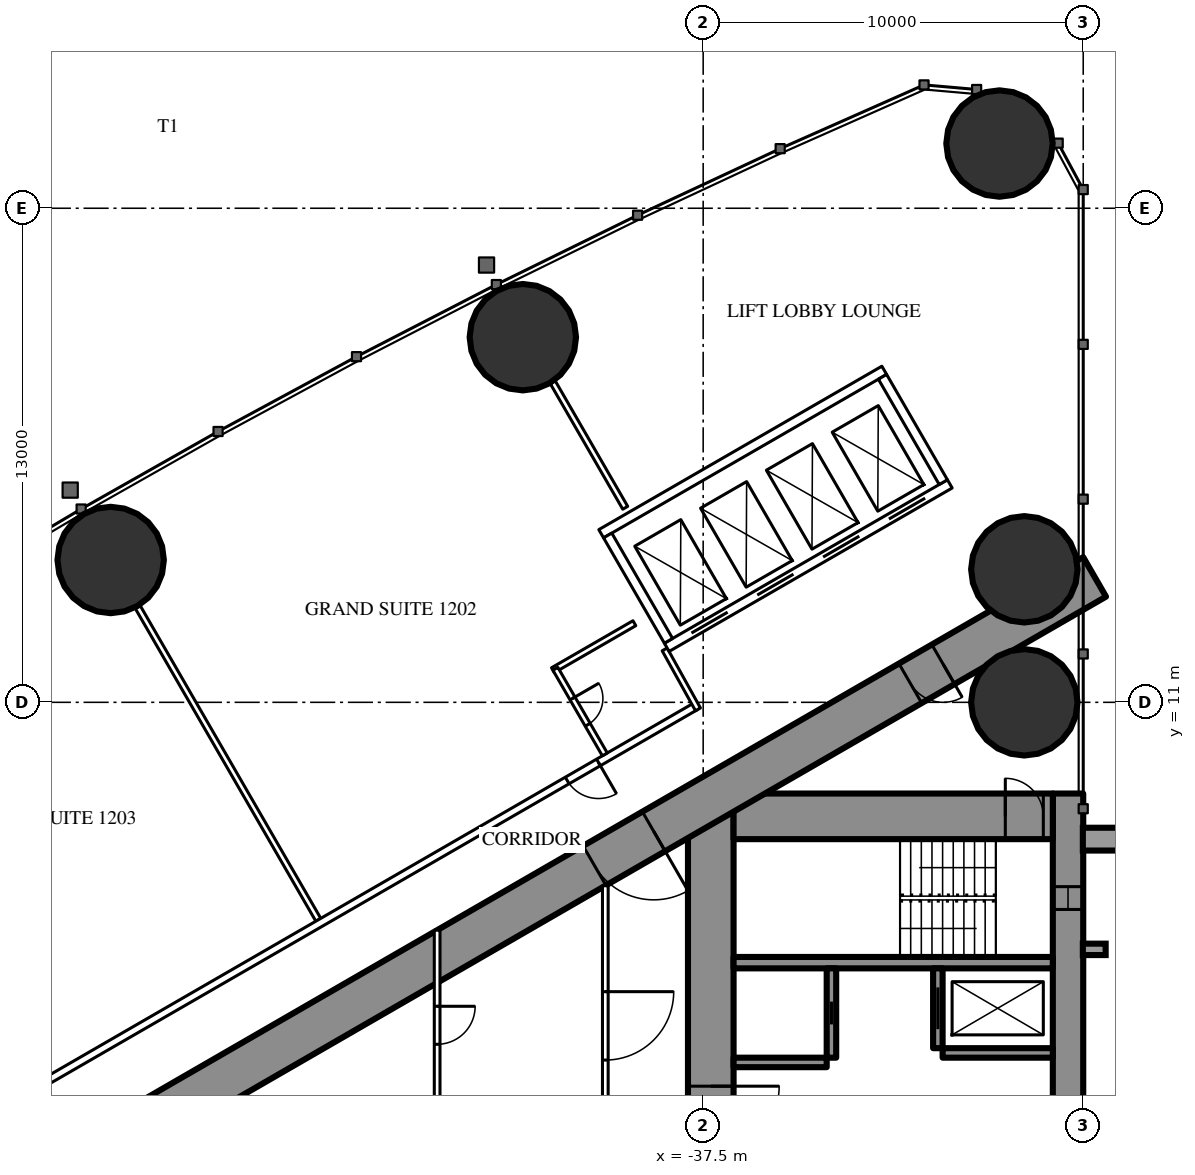
"""IFC4 building model, lengths in metres.
Left out: names, types, materials, properties, quantities, classifications, styles, units other than length and angle.
Written with IfcOpenShell. Run it as: python <this file> out.ifc"""

import sys

from ifc_helpers import new_model, si_unit, direction, frame, frame_2d, origin, origin_2d, place, context, subcontext, project, spatial, rectangle, hollow_circle, extrude, element, fill, save


model = new_model("IFC4")
c1 = context("Model", 3, precision=1e-05, world=origin(), true_north=direction((0.0, 1.0)))
c2 = subcontext(c1, "Body", "Model", "MODEL_VIEW")
j1 = project(units=[si_unit("LENGTHUNIT", "METRE"), si_unit("PLANEANGLEUNIT", "RADIAN")], contexts=[c1])
p1 = place(None, origin())
s1 = spatial("IfcSite", under=j1, at=p1, CompositionType="ELEMENT")
p2 = place(p1, origin())
s2 = spatial("IfcBuilding", under=s1, at=p2, CompositionType="ELEMENT")
p3 = place(p2, frame((0.0, 0.0, 49.5)))
s3 = spatial("IfcBuildingStorey", under=s2, at=p3, CompositionType="ELEMENT", Elevation=49.5)
for number, where, z_axis, x_axis in (
    (1, (-29.703, 25.703, 0.0), (0.0, 0.0, 1.0), (1.0, 0.0, 0.0)),
    (2, (-29.05, 11.0, 0.0), (0.0, 0.0, 1.0), (1.0, 0.0, 0.0)),
    (3, (-29.05, 14.5, 0.0), (0.0, 0.0, 1.0), (1.0, 0.0, 0.0)),
    (4, (-42.245, 20.607, 0.0), (0.0, 0.0, 1.0), (1.0, 0.0, 0.0)),
    (5, (-53.09, 14.745, 0.0), (0.0, 0.0, 1.0), (1.0, 0.0, 0.0)),
):
    element("IfcColumn", number, at=place(p3, frame(where, z_axis=z_axis, x_axis=x_axis)), inside=s3, PredefinedType="COLUMN", context=c2, shape_type="SweptSolid", body=[
        extrude(hollow_circle(Radius=1.4, WallThickness=0.12, at=origin_2d()), origin(), (0.0, 0.0, 1.0), 3.5),
    ])
p4 = place(p3, frame((-27.9, 8.6, 0.0), z_axis=(0.0, 0.0, 1.0), x_axis=(0.0, -1.0, 0.0)))
e6 = element("IfcWall", 6, at=p4, inside=s3, PredefinedType="SHEAR", context=c2, shape_type="SweptSolid", body=[
    extrude(rectangle(XDim=17.2, YDim=0.8, at=frame_2d((8.6, 0.0))), origin(), (0.0, 0.0, 1.0), 3.5),
])
p5 = place(p4, frame((2.45, 0.0, 0.6)))
e7 = element("IfcOpeningElement", 7, at=p5, cuts=e6, PredefinedType="OPENING", context=c2, shape_type="SweptSolid", body=[
    extrude(rectangle(XDim=0.6, YDim=2.1, at=frame_2d((0.3, 1.05))), frame((0.0, 0.41, 0.0), z_axis=(0.0, -1.0, 0.0), x_axis=(1.0, 0.0, 0.0)), (0.0, 0.0, 1.0), 0.82),
])
p6 = place(p4, frame((14.15, 0.0, 0.6)))
e8 = element("IfcOpeningElement", 8, at=p6, cuts=e6, PredefinedType="OPENING", context=c2, shape_type="SweptSolid", body=[
    extrude(rectangle(XDim=0.6, YDim=2.1, at=frame_2d((0.3, 1.05))), frame((0.0, 0.41, 0.0), z_axis=(0.0, -1.0, 0.0), x_axis=(1.0, 0.0, 0.0)), (0.0, 0.0, 1.0), 0.82),
])
p7 = place(p3, frame((-37.3, 8.6, 0.0), z_axis=(0.0, 0.0, 1.0), x_axis=(0.0, -1.0, 0.0)))
e9 = element("IfcWall", 9, at=p7, inside=s3, PredefinedType="SHEAR", context=c2, shape_type="SweptSolid", body=[
    extrude(rectangle(XDim=17.2, YDim=1.2, at=frame_2d((8.6, 0.0))), origin(), (0.0, 0.0, 1.0), 3.5),
])
p8 = place(p7, frame((7.7, 0.0, 0.0)))
e10 = element("IfcOpeningElement", 10, at=p8, cuts=e9, PredefinedType="OPENING", context=c2, shape_type="SweptSolid", body=[
    extrude(rectangle(XDim=1.8, YDim=2.2, at=frame_2d((0.9, 1.1))), frame((0.0, 0.61, 0.0), z_axis=(0.0, -1.0, 0.0), x_axis=(1.0, 0.0, 0.0)), (0.0, 0.0, 1.0), 1.22),
])
p9 = place(p3, frame((-28.3, 8.0, 0.0), z_axis=(0.0, 0.0, 1.0), x_axis=(-1.0, 0.0, 0.0)))
e11 = element("IfcWall", 11, at=p9, inside=s3, PredefinedType="SHEAR", context=c2, shape_type="SweptSolid", body=[
    extrude(rectangle(XDim=8.4, YDim=1.2, at=frame_2d((4.2, 0.0))), origin(), (0.0, 0.0, 1.0), 3.5),
])
p10 = place(p9, frame((0.25, 0.0, 0.0)))
e12 = element("IfcOpeningElement", 12, at=p10, cuts=e11, PredefinedType="OPENING", context=c2, shape_type="SweptSolid", body=[
    extrude(rectangle(XDim=1.0, YDim=2.2, at=frame_2d((0.5, 1.1))), frame((0.0, 0.61, 0.0), z_axis=(0.0, -1.0, 0.0), x_axis=(1.0, 0.0, 0.0)), (0.0, 0.0, 1.0), 1.22),
])
p11 = place(p3, frame((-28.3, 4.15, 0.0), z_axis=(0.0, 0.0, 1.0), x_axis=(-1.0, 0.0, 0.0)))
e13 = element("IfcWall", 13, at=p11, inside=s3, PredefinedType="SHEAR", context=c2, shape_type="SweptSolid", body=[
    extrude(rectangle(XDim=8.4, YDim=0.3, at=frame_2d((4.2, 0.0))), origin(), (0.0, 0.0, 1.0), 3.5),
])
p12 = place(p3, frame((-31.325, 4.0, 0.0), z_axis=(0.0, 0.0, 1.0), x_axis=(0.0, -1.0, 0.0)))
e14 = element("IfcWall", 14, at=p12, inside=s3, PredefinedType="SHEAR", context=c2, shape_type="SweptSolid", body=[
    extrude(rectangle(XDim=2.1, YDim=0.25, at=frame_2d((1.05, 0.0))), origin(), (0.0, 0.0, 1.0), 3.5),
])
p13 = place(p12, frame((0.5, 0.0, 0.0)))
e15 = element("IfcOpeningElement", 15, at=p13, cuts=e14, PredefinedType="OPENING", context=c2, shape_type="SweptSolid", body=[
    extrude(rectangle(XDim=1.1, YDim=2.2, at=frame_2d((0.55, 1.1))), frame((0.0, 0.135, 0.0), z_axis=(0.0, -1.0, 0.0), x_axis=(1.0, 0.0, 0.0)), (0.0, 0.0, 1.0), 0.27),
])
p14 = place(p3, frame((-34.125, 4.0, 0.0), z_axis=(0.0, 0.0, 1.0), x_axis=(0.0, -1.0, 0.0)))
e16 = element("IfcWall", 16, at=p14, inside=s3, PredefinedType="SHEAR", context=c2, shape_type="SweptSolid", body=[
    extrude(rectangle(XDim=2.35, YDim=0.25, at=frame_2d((1.175, 0.0))), origin(), (0.0, 0.0, 1.0), 3.5),
])
p15 = place(p14, frame((0.875, 0.0, 0.0)))
e17 = element("IfcOpeningElement", 17, at=p15, cuts=e16, PredefinedType="OPENING", context=c2, shape_type="SweptSolid", body=[
    extrude(rectangle(XDim=0.6, YDim=2.0, at=frame_2d((0.3, 1.0))), frame((0.0, 0.135, 0.0), z_axis=(0.0, -1.0, 0.0), x_axis=(1.0, 0.0, 0.0)), (0.0, 0.0, 1.0), 0.27),
])
p16 = place(p3, frame((-28.3, 1.775, 0.0), z_axis=(0.0, 0.0, 1.0), x_axis=(-1.0, 0.0, 0.0)))
e18 = element("IfcWall", 18, at=p16, inside=s3, PredefinedType="SHEAR", context=c2, shape_type="SweptSolid", body=[
    extrude(rectangle(XDim=2.9, YDim=0.25, at=frame_2d((1.45, 0.0))), origin(), (0.0, 0.0, 1.0), 3.5),
])
p17 = place(p3, frame((-34.25, 1.525, 0.0), z_axis=(0.0, 0.0, 1.0), x_axis=(-1.0, 0.0, 0.0)))
e19 = element("IfcWall", 19, at=p17, inside=s3, PredefinedType="SHEAR", context=c2, shape_type="SweptSolid", body=[
    extrude(rectangle(XDim=2.45, YDim=0.25, at=frame_2d((1.225, 0.0))), origin(), (0.0, 0.0, 1.0), 3.5),
])
p18 = place(p3, frame((-27.2, 14.3, 0.0), z_axis=(0.0, 0.0, 1.0), x_axis=(-0.866026593062, -0.499997940104, 0.0)))
e20 = element("IfcWall", 20, at=p18, inside=s3, PredefinedType="SHEAR", context=c2, shape_type="SweptSolid", body=[
    extrude(rectangle(XDim=28.946, YDim=1.2, at=frame_2d((14.473, 0.0))), origin(), (0.0, 0.0, 1.0), 3.5),
])
p19 = place(p18, frame((4.6, 0.0, 0.0)))
e21 = element("IfcOpeningElement", 21, at=p19, cuts=e20, PredefinedType="OPENING", context=c2, shape_type="SweptSolid", body=[
    extrude(rectangle(XDim=1.0, YDim=2.2, at=frame_2d((0.5, 1.1))), frame((0.0, 0.61, 0.0), z_axis=(0.0, -1.0, 0.0), x_axis=(1.0, 0.0, 0.0)), (0.0, 0.0, 1.0), 1.22),
])
p20 = place(p18, frame((13.395, 0.0, 0.0)))
e22 = element("IfcOpeningElement", 22, at=p20, cuts=e20, PredefinedType="OPENING", context=c2, shape_type="SweptSolid", body=[
    extrude(rectangle(XDim=1.8, YDim=2.2, at=frame_2d((0.9, 1.1))), frame((0.0, 0.61, 0.0), z_axis=(0.0, -1.0, 0.0), x_axis=(1.0, 0.0, 0.0)), (0.0, 0.0, 1.0), 1.22),
])
p21 = place(p3, frame((-47.627, 5.278, 0.0), z_axis=(0.0, 0.0, 1.0), x_axis=(-0.500009844318, 0.86601972009, 0.0)))
e23 = element("IfcWall", 23, at=p21, inside=s3, PredefinedType="PARTITIONING", context=c2, shape_type="SweptSolid", body=[
    extrude(rectangle(XDim=9.51, YDim=0.15, at=frame_2d((4.755, 0.0))), origin(), (0.0, 0.0, 1.0), 2.25),
])
p22 = place(p3, frame((-39.551, 16.119, 0.0), z_axis=(0.0, 0.0, 1.0), x_axis=(-0.500014214979, 0.866017196607, 0.0)))
e24 = element("IfcWall", 24, at=p22, inside=s3, PredefinedType="PARTITIONING", context=c2, shape_type="SweptSolid", body=[
    extrude(rectangle(XDim=3.815, YDim=0.15, at=frame_2d((1.907, 0.0))), origin(), (0.0, 0.0, 1.0), 3.25),
])
p23 = place(p3, frame((-37.7, 10.894, 0.0), z_axis=(0.0, 0.0, 1.0), x_axis=(-0.866027905338, -0.499995667157, 0.0)))
e25 = element("IfcWall", 25, at=p23, inside=s3, PredefinedType="PARTITIONING", context=c2, shape_type="SweptSolid", body=[
    extrude(rectangle(XDim=21.787, YDim=0.2, at=frame_2d((10.894, 0.0))), origin(), (0.0, 0.0, 1.0), 3.25),
])
p24 = place(p23, frame((20.237, 0.0, 0.0)))
e26 = element("IfcOpeningElement", 26, at=p24, cuts=e25, PredefinedType="OPENING", context=c2, shape_type="SweptSolid", body=[
    extrude(rectangle(XDim=0.95, YDim=2.2, at=frame_2d((0.475, 1.1))), frame((0.0, 0.11, 0.0), z_axis=(0.0, -1.0, 0.0), x_axis=(1.0, 0.0, 0.0)), (0.0, 0.0, 1.0), 0.22),
])
p25 = place(p23, frame((2.95, 0.0, 0.0)))
e27 = element("IfcOpeningElement", 27, at=p25, cuts=e25, PredefinedType="OPENING", context=c2, shape_type="SweptSolid", body=[
    extrude(rectangle(XDim=0.95, YDim=2.2, at=frame_2d((0.475, 1.1))), frame((0.0, 0.11, 0.0), z_axis=(0.0, -1.0, 0.0), x_axis=(1.0, 0.0, 0.0)), (0.0, 0.0, 1.0), 0.22),
])
p26 = place(p3, frame((-38.513, 12.392, 0.0), z_axis=(0.0, 0.0, 1.0), x_axis=(0.485585508183, -0.874189175317, 0.0)))
e28 = element("IfcWall", 28, at=p26, inside=s3, PredefinedType="PARTITIONING", context=c2, shape_type="SweptSolid", body=[
    extrude(rectangle(XDim=1.805, YDim=0.15, at=frame_2d((0.902, 0.0))), origin(), (0.0, 0.0, 1.0), 3.25),
])
p27 = place(p3, frame((-39.31, 13.082, 0.0), z_axis=(0.0, 0.0, 1.0), x_axis=(-0.866031185235, -0.4999899861, 0.0)))
e29 = element("IfcWall", 29, at=p27, inside=s3, PredefinedType="PARTITIONING", context=c2, shape_type="SweptSolid", body=[
    extrude(rectangle(XDim=2.475, YDim=0.15, at=frame_2d((1.238, 0.0))), origin(), (0.0, 0.0, 1.0), 3.25),
])
p28 = place(p3, frame((-40.088, 9.63, 0.0), z_axis=(0.0, 0.0, 1.0), x_axis=(-0.500006934395, 0.866021400173, 0.0)))
e30 = element("IfcWall", 30, at=p28, inside=s3, PredefinedType="PARTITIONING", context=c2, shape_type="SweptSolid", body=[
    extrude(rectangle(XDim=2.6, YDim=0.15, at=frame_2d((1.3, 0.0))), origin(), (0.0, 0.0, 1.0), 3.25),
])
p29 = place(p28, frame((0.9, 0.0, 0.0)))
e31 = element("IfcOpeningElement", 31, at=p29, cuts=e30, PredefinedType="OPENING", context=c2, shape_type="SweptSolid", body=[
    extrude(rectangle(XDim=0.8, YDim=2.2, at=frame_2d((0.4, 1.1))), frame((0.0, 0.085, 0.0), z_axis=(0.0, -1.0, 0.0), x_axis=(1.0, 0.0, 0.0)), (0.0, 0.0, 1.0), 0.17),
])
p30 = place(p3, frame((-40.075, 6.174, 0.0), z_axis=(0.0, 0.0, 1.0), x_axis=(0.0, -1.0, 0.0)))
e32 = element("IfcWall", 32, at=p30, inside=s3, PredefinedType="PARTITIONING", context=c2, shape_type="SweptSolid", body=[
    extrude(rectangle(XDim=7.374, YDim=0.15, at=frame_2d((3.687, 0.0))), origin(), (0.0, 0.0, 1.0), 3.25),
])
p31 = place(p30, frame((2.787, 0.0, 0.0)))
e33 = element("IfcOpeningElement", 33, at=p31, cuts=e32, PredefinedType="OPENING", context=c2, shape_type="SweptSolid", body=[
    extrude(rectangle(XDim=1.8, YDim=2.2, at=frame_2d((0.9, 1.1))), frame((0.0, 0.085, 0.0), z_axis=(0.0, -1.0, 0.0), x_axis=(1.0, 0.0, 0.0)), (0.0, 0.0, 1.0), 0.17),
])
p32 = place(p3, frame((-44.5, 5.005, 0.0), z_axis=(0.0, 0.0, 1.0), x_axis=(0.0, -1.0, 0.0)))
e34 = element("IfcWall", 34, at=p32, inside=s3, PredefinedType="PARTITIONING", context=c2, shape_type="SweptSolid", body=[
    extrude(rectangle(XDim=10.009, YDim=0.15, at=frame_2d((5.005, 0.0))), origin(), (0.0, 0.0, 1.0), 2.45),
])
p33 = place(p32, frame((2.002, 0.0, 0.0)))
e35 = element("IfcOpeningElement", 35, at=p33, cuts=e34, PredefinedType="OPENING", context=c2, shape_type="SweptSolid", body=[
    extrude(rectangle(XDim=1.0, YDim=2.2, at=frame_2d((0.5, 1.1))), frame((0.0, 0.085, 0.0), z_axis=(0.0, -1.0, 0.0), x_axis=(1.0, 0.0, 0.0)), (0.0, 0.0, 1.0), 0.17),
])
p34 = place(p32, frame((7.007, 0.0, 0.0)))
e36 = element("IfcOpeningElement", 36, at=p34, cuts=e34, PredefinedType="OPENING", context=c2, shape_type="SweptSolid", body=[
    extrude(rectangle(XDim=1.0, YDim=2.2, at=frame_2d((0.5, 1.1))), frame((0.0, 0.085, 0.0), z_axis=(0.0, -1.0, 0.0), x_axis=(1.0, 0.0, 0.0)), (0.0, 0.0, 1.0), 0.17),
])
p35 = place(p3, frame((-31.01, 16.747, 0.0), z_axis=(0.0, 0.0, 1.0), x_axis=(-0.866028165386, -0.499995216735, 0.0)))
e37 = element("IfcWall", 37, at=p35, inside=s3, PredefinedType="PARTITIONING", context=c2, shape_type="SweptSolid", body=[
    extrude(rectangle(XDim=8.6, YDim=0.25, at=frame_2d((4.3, 0.0))), origin(), (0.0, 0.0, 1.0), 3.25),
])
p36 = place(p35, frame((0.75, 0.0, 0.0)))
e38 = element("IfcOpeningElement", 38, at=p36, cuts=e37, PredefinedType="OPENING", context=c2, shape_type="SweptSolid", body=[
    extrude(rectangle(XDim=1.1, YDim=2.2, at=frame_2d((0.55, 1.1))), frame((0.0, 0.135, 0.0), z_axis=(0.0, -1.0, 0.0), x_axis=(1.0, 0.0, 0.0)), (0.0, 0.0, 1.0), 0.27),
])
p37 = place(p35, frame((2.75, 0.0, 0.0)))
e39 = element("IfcOpeningElement", 39, at=p37, cuts=e37, PredefinedType="OPENING", context=c2, shape_type="SweptSolid", body=[
    extrude(rectangle(XDim=1.1, YDim=2.2, at=frame_2d((0.55, 1.1))), frame((0.0, 0.135, 0.0), z_axis=(0.0, -1.0, 0.0), x_axis=(1.0, 0.0, 0.0)), (0.0, 0.0, 1.0), 0.27),
])
p38 = place(p35, frame((4.75, 0.0, 0.0)))
e40 = element("IfcOpeningElement", 40, at=p38, cuts=e37, PredefinedType="OPENING", context=c2, shape_type="SweptSolid", body=[
    extrude(rectangle(XDim=1.1, YDim=2.2, at=frame_2d((0.55, 1.1))), frame((0.0, 0.135, 0.0), z_axis=(0.0, -1.0, 0.0), x_axis=(1.0, 0.0, 0.0)), (0.0, 0.0, 1.0), 0.27),
])
p39 = place(p35, frame((6.75, 0.0, 0.0)))
e41 = element("IfcOpeningElement", 41, at=p39, cuts=e37, PredefinedType="OPENING", context=c2, shape_type="SweptSolid", body=[
    extrude(rectangle(XDim=1.1, YDim=2.2, at=frame_2d((0.55, 1.1))), frame((0.0, 0.135, 0.0), z_axis=(0.0, -1.0, 0.0), x_axis=(1.0, 0.0, 0.0)), (0.0, 0.0, 1.0), 0.27),
])
p40 = place(p3, frame((-32.736, 19.736, 0.0), z_axis=(0.0, 0.0, 1.0), x_axis=(-0.866028165386, -0.499995216735, 0.0)))
e42 = element("IfcWall", 42, at=p40, inside=s3, PredefinedType="PARTITIONING", context=c2, shape_type="SweptSolid", body=[
    extrude(rectangle(XDim=8.6, YDim=0.25, at=frame_2d((4.3, 0.0))), origin(), (0.0, 0.0, 1.0), 3.25),
])
p41 = place(p3, frame((-31.181, 16.793, 0.0), z_axis=(0.0, 0.0, 1.0), x_axis=(-0.499929347863, 0.866066190972, 0.0)))
e43 = element("IfcWall", 43, at=p41, inside=s3, PredefinedType="PARTITIONING", context=c2, shape_type="SweptSolid", body=[
    extrude(rectangle(XDim=3.201, YDim=0.25, at=frame_2d((1.6, 0.0))), origin(), (0.0, 0.0, 1.0), 3.25),
])
p42 = place(p3, frame((-38.413, 12.618, 0.0), z_axis=(0.0, 0.0, 1.0), x_axis=(-0.499872130319, 0.866099216793, 0.0)))
e44 = element("IfcWall", 44, at=p42, inside=s3, PredefinedType="PARTITIONING", context=c2, shape_type="SweptSolid", body=[
    extrude(rectangle(XDim=3.2, YDim=0.25, at=frame_2d((1.6, 0.0))), origin(), (0.0, 0.0, 1.0), 3.25),
])
p43 = place(p29, origin())
e45 = element("IfcDoor", 45, at=p43, inside=s3, OperationType="SINGLE_SWING_RIGHT", PredefinedType="DOOR", context=c2, shape_type="SweptSolid", body=[
    extrude(rectangle(XDim=0.8, YDim=2.2, at=frame_2d((0.4, 1.1))), frame((0.0, 0.025, 0.0), z_axis=(0.0, -1.0, 0.0), x_axis=(1.0, 0.0, 0.0)), (0.0, 0.0, 1.0), 0.05),
])
fill(e31, e45)
p44 = place(p25, origin())
e46 = element("IfcDoor", 46, at=p44, inside=s3, OperationType="SINGLE_SWING_LEFT", PredefinedType="DOOR", context=c2, shape_type="SweptSolid", body=[
    extrude(rectangle(XDim=0.95, YDim=2.2, at=frame_2d((0.475, 1.1))), frame((0.0, 0.025, 0.0), z_axis=(0.0, -1.0, 0.0), x_axis=(1.0, 0.0, 0.0)), (0.0, 0.0, 1.0), 0.05),
])
fill(e27, e46)
p45 = place(p31, origin())
e47 = element("IfcDoor", 47, at=p45, inside=s3, OperationType="DOUBLE_DOOR_SINGLE_SWING", PredefinedType="DOOR", context=c2, shape_type="SweptSolid", body=[
    extrude(rectangle(XDim=1.8, YDim=2.2, at=frame_2d((0.9, 1.1))), frame((0.0, 0.025, 0.0), z_axis=(0.0, -1.0, 0.0), x_axis=(1.0, 0.0, 0.0)), (0.0, 0.0, 1.0), 0.05),
])
fill(e33, e47)
p46 = place(p33, origin())
e48 = element("IfcDoor", 48, at=p46, inside=s3, OperationType="SINGLE_SWING_LEFT", PredefinedType="DOOR", context=c2, shape_type="SweptSolid", body=[
    extrude(rectangle(XDim=1.0, YDim=2.2, at=frame_2d((0.5, 1.1))), frame((0.0, 0.025, 0.0), z_axis=(0.0, -1.0, 0.0), x_axis=(1.0, 0.0, 0.0)), (0.0, 0.0, 1.0), 0.05),
])
fill(e35, e48)
p47 = place(p19, origin())
e49 = element("IfcDoor", 49, at=p47, inside=s3, OperationType="SINGLE_SWING_LEFT", PredefinedType="DOOR", context=c2, shape_type="SweptSolid", body=[
    extrude(rectangle(XDim=1.0, YDim=2.2, at=frame_2d((0.5, 1.1))), frame((0.0, 0.025, 0.0), z_axis=(0.0, -1.0, 0.0), x_axis=(1.0, 0.0, 0.0)), (0.0, 0.0, 1.0), 0.05),
])
fill(e21, e49)
p48 = place(p20, origin())
e50 = element("IfcDoor", 50, at=p48, inside=s3, OperationType="DOUBLE_DOOR_SINGLE_SWING", PredefinedType="DOOR", context=c2, shape_type="SweptSolid", body=[
    extrude(rectangle(XDim=1.8, YDim=2.2, at=frame_2d((0.9, 1.1))), frame((0.0, 0.025, 0.0), z_axis=(0.0, -1.0, 0.0), x_axis=(1.0, 0.0, 0.0)), (0.0, 0.0, 1.0), 0.05),
])
fill(e22, e50)
p49 = place(p8, origin())
e51 = element("IfcDoor", 51, at=p49, inside=s3, OperationType="DOUBLE_DOOR_SINGLE_SWING", PredefinedType="DOOR", context=c2, shape_type="SweptSolid", body=[
    extrude(rectangle(XDim=1.8, YDim=2.2, at=frame_2d((0.9, 1.1))), frame((0.0, 0.025, 0.0), z_axis=(0.0, -1.0, 0.0), x_axis=(1.0, 0.0, 0.0)), (0.0, 0.0, 1.0), 0.05),
])
fill(e10, e51)
p50 = place(p10, origin())
e52 = element("IfcDoor", 52, at=p50, inside=s3, OperationType="SINGLE_SWING_RIGHT", PredefinedType="DOOR", context=c2, shape_type="SweptSolid", body=[
    extrude(rectangle(XDim=1.0, YDim=2.2, at=frame_2d((0.5, 1.1))), frame((0.0, 0.025, 0.0), z_axis=(0.0, -1.0, 0.0), x_axis=(1.0, 0.0, 0.0)), (0.0, 0.0, 1.0), 0.05),
])
fill(e12, e52)
p51 = place(p13, origin())
e53 = element("IfcDoor", 53, at=p51, inside=s3, OperationType="SLIDING_TO_LEFT", PredefinedType="USERDEFINED", context=c2, shape_type="SweptSolid", body=[
    extrude(rectangle(XDim=1.1, YDim=2.2, at=frame_2d((0.55, 1.1))), frame((0.0, 0.025, 0.0), z_axis=(0.0, -1.0, 0.0), x_axis=(1.0, 0.0, 0.0)), (0.0, 0.0, 1.0), 0.05),
])
fill(e15, e53)
p52 = place(p15, origin())
e54 = element("IfcDoor", 54, at=p52, inside=s3, OperationType="SLIDING_TO_LEFT", PredefinedType="DOOR", context=c2, shape_type="SweptSolid", body=[
    extrude(rectangle(XDim=0.6, YDim=2.0, at=frame_2d((0.3, 1.0))), frame((0.0, 0.025, 0.0), z_axis=(0.0, -1.0, 0.0), x_axis=(1.0, 0.0, 0.0)), (0.0, 0.0, 1.0), 0.05),
])
fill(e17, e54)
p53 = place(p36, origin())
e55 = element("IfcDoor", 55, at=p53, inside=s3, OperationType="DOUBLE_DOOR_SLIDING", PredefinedType="USERDEFINED", context=c2, shape_type="SweptSolid", body=[
    extrude(rectangle(XDim=1.1, YDim=2.2, at=frame_2d((0.55, 1.1))), frame((0.0, 0.025, 0.0), z_axis=(0.0, -1.0, 0.0), x_axis=(1.0, 0.0, 0.0)), (0.0, 0.0, 1.0), 0.05),
])
fill(e38, e55)
p54 = place(p37, origin())
e56 = element("IfcDoor", 56, at=p54, inside=s3, OperationType="DOUBLE_DOOR_SLIDING", PredefinedType="USERDEFINED", context=c2, shape_type="SweptSolid", body=[
    extrude(rectangle(XDim=1.1, YDim=2.2, at=frame_2d((0.55, 1.1))), frame((0.0, 0.025, 0.0), z_axis=(0.0, -1.0, 0.0), x_axis=(1.0, 0.0, 0.0)), (0.0, 0.0, 1.0), 0.05),
])
fill(e39, e56)
p55 = place(p38, origin())
e57 = element("IfcDoor", 57, at=p55, inside=s3, OperationType="DOUBLE_DOOR_SLIDING", PredefinedType="USERDEFINED", context=c2, shape_type="SweptSolid", body=[
    extrude(rectangle(XDim=1.1, YDim=2.2, at=frame_2d((0.55, 1.1))), frame((0.0, 0.025, 0.0), z_axis=(0.0, -1.0, 0.0), x_axis=(1.0, 0.0, 0.0)), (0.0, 0.0, 1.0), 0.05),
])
fill(e40, e57)
p56 = place(p39, origin())
e58 = element("IfcDoor", 58, at=p56, inside=s3, OperationType="DOUBLE_DOOR_SLIDING", PredefinedType="USERDEFINED", context=c2, shape_type="SweptSolid", body=[
    extrude(rectangle(XDim=1.1, YDim=2.2, at=frame_2d((0.55, 1.1))), frame((0.0, 0.025, 0.0), z_axis=(0.0, -1.0, 0.0), x_axis=(1.0, 0.0, 0.0)), (0.0, 0.0, 1.0), 0.05),
])
fill(e41, e58)
p57 = place(p5, origin())
e59 = element("IfcWindow", 59, at=p57, inside=s3, PartitioningType="SINGLE_PANEL", PredefinedType="WINDOW", context=c2, shape_type="SweptSolid", body=[
    extrude(rectangle(XDim=0.6, YDim=2.1, at=frame_2d((0.3, 1.05))), frame((0.0, 0.03, 0.0), z_axis=(0.0, -1.0, 0.0), x_axis=(1.0, 0.0, 0.0)), (0.0, 0.0, 1.0), 0.06),
])
fill(e7, e59)
save(model, sys.argv[1])
